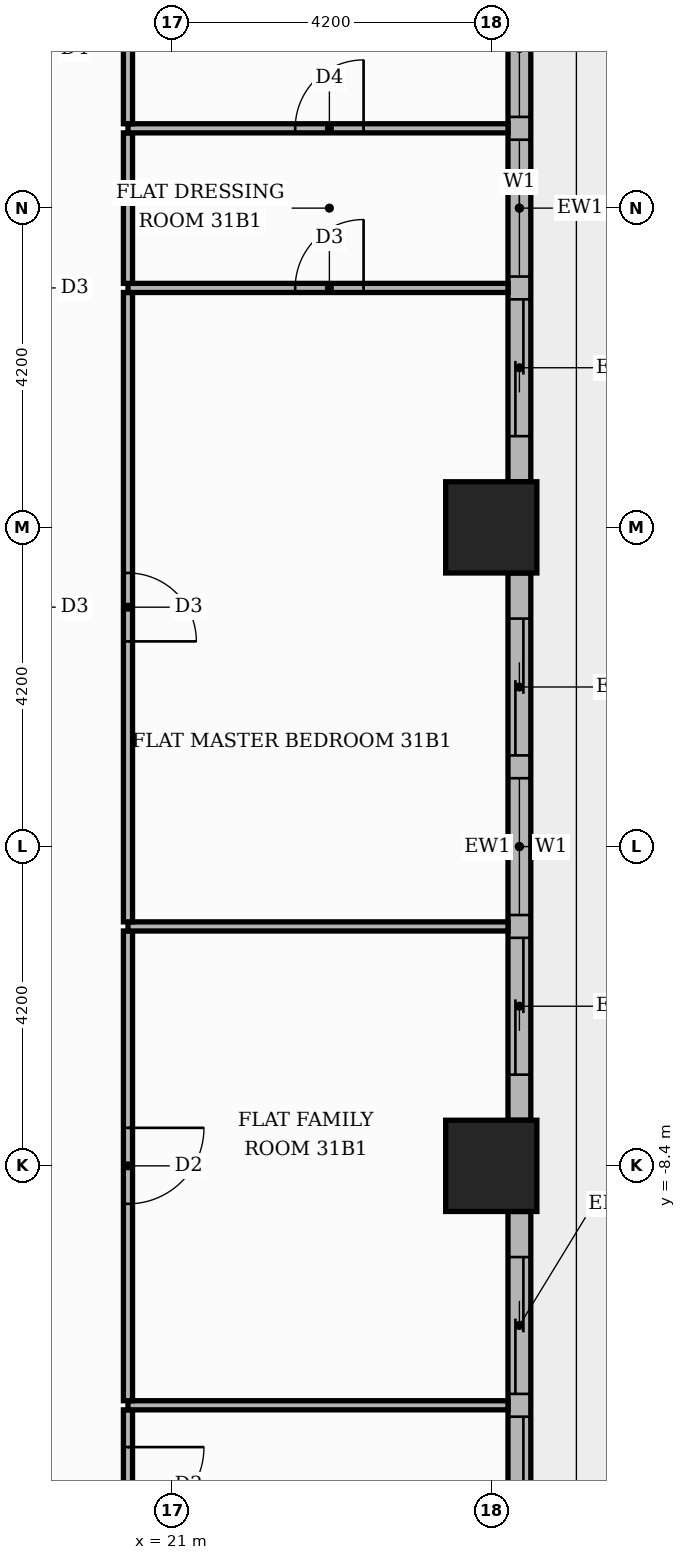
"""IFC4 building model, lengths in metres.
Left out: names, types, materials, properties, quantities, classifications, styles, units other than length and angle.
Written with IfcOpenShell. Run it as: python <this file> out.ifc"""

import sys

from ifc_helpers import new_model, si_unit, direction, frame, frame_2d, origin, origin_2d, place, context, subcontext, project, spatial, rectangle, extrude, element, fill, save


model = new_model("IFC4")
c1 = context("Model", 3, precision=1e-05, world=origin(), true_north=direction((0.0, 1.0)))
c2 = subcontext(c1, "Body", "Model", "MODEL_VIEW")
j1 = project(units=[si_unit("LENGTHUNIT", "METRE"), si_unit("PLANEANGLEUNIT", "RADIAN")], contexts=[c1])
p1 = place(None, origin())
s1 = spatial("IfcSite", under=j1, at=p1, CompositionType="ELEMENT")
p2 = place(p1, origin())
s2 = spatial("IfcBuilding", under=s1, at=p2, CompositionType="ELEMENT")
p3 = place(p2, frame((0.0, 0.0, 133.8)))
s3 = spatial("IfcBuildingStorey", under=s2, at=p3, CompositionType="ELEMENT", Elevation=133.8)
for number, where, z_axis, x_axis in (
    (1, (25.2, 0.0, 0.0), (0.0, 0.0, 1.0), (1.0, 0.0, 0.0)),
    (2, (25.2, -8.4, 0.0), (0.0, 0.0, 1.0), (1.0, 0.0, 0.0)),
):
    element("IfcColumn", number, at=place(p3, frame(where, z_axis=z_axis, x_axis=x_axis)), inside=s3, PredefinedType="COLUMN", context=c2, shape_type="SweptSolid", body=[
        extrude(rectangle(XDim=1.2, YDim=1.2, at=origin_2d()), origin(), (0.0, 0.0, 1.0), 3.9),
    ])
p4 = place(p3, frame((25.57, -16.2, 0.0), z_axis=(0.0, 0.0, 1.0), x_axis=(0.0, 1.0, 0.0)))
e3 = element("IfcWall", 3, at=p4, inside=s3, PredefinedType="STANDARD", context=c2, shape_type="SweptSolid", body=[
    extrude(rectangle(XDim=7.2, YDim=0.3, at=frame_2d((3.6, 0.0))), origin(), (0.0, 0.0, 1.0), 3.48),
])
p5 = place(p4, frame((0.6, 0.0, 0.0)))
e4 = element("IfcOpeningElement", 4, at=p5, cuts=e3, PredefinedType="OPENING", context=c2, shape_type="SweptSolid", body=[
    extrude(rectangle(XDim=3.9, YDim=2.4, at=frame_2d((1.95, 1.2))), frame((0.0, 0.16, 0.0), z_axis=(0.0, -1.0, 0.0), x_axis=(1.0, 0.0, 0.0)), (0.0, 0.0, 1.0), 0.32),
])
p6 = place(p4, frame((4.8, 0.0, 0.0)))
e5 = element("IfcOpeningElement", 5, at=p6, cuts=e3, PredefinedType="OPENING", context=c2, shape_type="SweptSolid", body=[
    extrude(rectangle(XDim=1.8, YDim=2.4, at=frame_2d((0.9, 1.2))), frame((0.0, 0.16, 0.0), z_axis=(0.0, -1.0, 0.0), x_axis=(1.0, 0.0, 0.0)), (0.0, 0.0, 1.0), 0.32),
])
p7 = place(p3, frame((25.57, -7.8, 0.0), z_axis=(0.0, 0.0, 1.0), x_axis=(0.0, 1.0, 0.0)))
e6 = element("IfcWall", 6, at=p7, inside=s3, PredefinedType="STANDARD", context=c2, shape_type="SweptSolid", body=[
    extrude(rectangle(XDim=7.2, YDim=0.3, at=frame_2d((3.6, 0.0))), origin(), (0.0, 0.0, 1.0), 3.48),
])
p8 = place(p7, frame((0.6, 0.0, 0.0)))
e7 = element("IfcOpeningElement", 7, at=p8, cuts=e6, PredefinedType="OPENING", context=c2, shape_type="SweptSolid", body=[
    extrude(rectangle(XDim=1.8, YDim=2.4, at=frame_2d((0.9, 1.2))), frame((0.0, 0.16, 0.0), z_axis=(0.0, -1.0, 0.0), x_axis=(1.0, 0.0, 0.0)), (0.0, 0.0, 1.0), 0.32),
])
p9 = place(p7, frame((2.7, 0.0, 0.9)))
e8 = element("IfcOpeningElement", 8, at=p9, cuts=e6, PredefinedType="OPENING", context=c2, shape_type="SweptSolid", body=[
    extrude(rectangle(XDim=1.8, YDim=2.1, at=frame_2d((0.9, 1.05))), frame((0.0, 0.16, 0.0), z_axis=(0.0, -1.0, 0.0), x_axis=(1.0, 0.0, 0.0)), (0.0, 0.0, 1.0), 0.32),
])
p10 = place(p7, frame((4.8, 0.0, 0.0)))
e9 = element("IfcOpeningElement", 9, at=p10, cuts=e6, PredefinedType="OPENING", context=c2, shape_type="SweptSolid", body=[
    extrude(rectangle(XDim=1.8, YDim=2.4, at=frame_2d((0.9, 1.2))), frame((0.0, 0.16, 0.0), z_axis=(0.0, -1.0, 0.0), x_axis=(1.0, 0.0, 0.0)), (0.0, 0.0, 1.0), 0.32),
])
p11 = place(p3, frame((25.57, 0.6, 0.0), z_axis=(0.0, 0.0, 1.0), x_axis=(0.0, 1.0, 0.0)))
e10 = element("IfcWall", 10, at=p11, inside=s3, PredefinedType="STANDARD", context=c2, shape_type="SweptSolid", body=[
    extrude(rectangle(XDim=7.2, YDim=0.3, at=frame_2d((3.6, 0.0))), origin(), (0.0, 0.0, 1.0), 3.48),
])
p12 = place(p11, frame((0.6, 0.0, 0.0)))
e11 = element("IfcOpeningElement", 11, at=p12, cuts=e10, PredefinedType="OPENING", context=c2, shape_type="SweptSolid", body=[
    extrude(rectangle(XDim=1.8, YDim=2.4, at=frame_2d((0.9, 1.2))), frame((0.0, 0.16, 0.0), z_axis=(0.0, -1.0, 0.0), x_axis=(1.0, 0.0, 0.0)), (0.0, 0.0, 1.0), 0.32),
])
p13 = place(p11, frame((2.7, 0.0, 0.9)))
e12 = element("IfcOpeningElement", 12, at=p13, cuts=e10, PredefinedType="OPENING", context=c2, shape_type="SweptSolid", body=[
    extrude(rectangle(XDim=1.8, YDim=2.1, at=frame_2d((0.9, 1.05))), frame((0.0, 0.16, 0.0), z_axis=(0.0, -1.0, 0.0), x_axis=(1.0, 0.0, 0.0)), (0.0, 0.0, 1.0), 0.32),
])
p14 = place(p11, frame((4.8, 0.0, 0.9)))
e13 = element("IfcOpeningElement", 13, at=p14, cuts=e10, PredefinedType="OPENING", context=c2, shape_type="SweptSolid", body=[
    extrude(rectangle(XDim=1.8, YDim=2.1, at=frame_2d((0.9, 1.05))), frame((0.0, 0.16, 0.0), z_axis=(0.0, -1.0, 0.0), x_axis=(1.0, 0.0, 0.0)), (0.0, 0.0, 1.0), 0.32),
])
p15 = place(p3, frame((20.42, -13.59, 0.0), z_axis=(0.0, 0.0, 1.0), x_axis=(0.0, 1.0, 0.0)))
e14 = element("IfcWall", 14, at=p15, inside=s3, PredefinedType="PARTITIONING", context=c2, shape_type="SweptSolid", body=[
    extrude(rectangle(XDim=1.98, YDim=0.12, at=frame_2d((0.99, 0.0))), origin(), (0.0, 0.0, 1.0), 3.48),
])
p16 = place(p15, frame((0.49, 0.0, 0.0)))
e15 = element("IfcOpeningElement", 15, at=p16, cuts=e14, PredefinedType="OPENING", context=c2, shape_type="SweptSolid", body=[
    extrude(rectangle(XDim=1.0, YDim=2.1, at=frame_2d((0.5, 1.05))), frame((0.0, 0.07, 0.0), z_axis=(0.0, -1.0, 0.0), x_axis=(1.0, 0.0, 0.0)), (0.0, 0.0, 1.0), 0.14),
])
p17 = place(p3, frame((20.42, -11.55, 0.0), z_axis=(0.0, 0.0, 1.0), x_axis=(1.0, 0.0, 0.0)))
e16 = element("IfcWall", 16, at=p17, inside=s3, PredefinedType="PARTITIONING", context=c2, shape_type="SweptSolid", body=[
    extrude(rectangle(XDim=5.0, YDim=0.12, at=frame_2d((2.5, 0.0))), origin(), (0.0, 0.0, 1.0), 3.48),
])
p18 = place(p3, frame((20.42, -11.49, 0.0), z_axis=(0.0, 0.0, 1.0), x_axis=(0.0, 1.0, 0.0)))
e17 = element("IfcWall", 17, at=p18, inside=s3, PredefinedType="PARTITIONING", context=c2, shape_type="SweptSolid", body=[
    extrude(rectangle(XDim=6.18, YDim=0.12, at=frame_2d((3.09, 0.0))), origin(), (0.0, 0.0, 1.0), 3.48),
])
p19 = place(p18, frame((2.59, 0.0, 0.0)))
e18 = element("IfcOpeningElement", 18, at=p19, cuts=e17, PredefinedType="OPENING", context=c2, shape_type="SweptSolid", body=[
    extrude(rectangle(XDim=1.0, YDim=2.1, at=frame_2d((0.5, 1.05))), frame((0.0, 0.07, 0.0), z_axis=(0.0, -1.0, 0.0), x_axis=(1.0, 0.0, 0.0)), (0.0, 0.0, 1.0), 0.14),
])
p20 = place(p3, frame((20.42, -5.25, 0.0), z_axis=(0.0, 0.0, 1.0), x_axis=(1.0, 0.0, 0.0)))
e19 = element("IfcWall", 19, at=p20, inside=s3, PredefinedType="PARTITIONING", context=c2, shape_type="SweptSolid", body=[
    extrude(rectangle(XDim=5.0, YDim=0.12, at=frame_2d((2.5, 0.0))), origin(), (0.0, 0.0, 1.0), 3.48),
])
p21 = place(p3, frame((20.42, -5.19, 0.0), z_axis=(0.0, 0.0, 1.0), x_axis=(0.0, 1.0, 0.0)))
e20 = element("IfcWall", 20, at=p21, inside=s3, PredefinedType="PARTITIONING", context=c2, shape_type="SweptSolid", body=[
    extrude(rectangle(XDim=8.28, YDim=0.12, at=frame_2d((4.14, 0.0))), origin(), (0.0, 0.0, 1.0), 3.48),
])
p22 = place(p21, frame((3.69, 0.0, 0.0)))
e21 = element("IfcOpeningElement", 21, at=p22, cuts=e20, PredefinedType="OPENING", context=c2, shape_type="SweptSolid", body=[
    extrude(rectangle(XDim=0.9, YDim=2.1, at=frame_2d((0.45, 1.05))), frame((0.0, 0.07, 0.0), z_axis=(0.0, -1.0, 0.0), x_axis=(1.0, 0.0, 0.0)), (0.0, 0.0, 1.0), 0.14),
])
p23 = place(p3, frame((20.42, 3.15, 0.0), z_axis=(0.0, 0.0, 1.0), x_axis=(1.0, 0.0, 0.0)))
e22 = element("IfcWall", 22, at=p23, inside=s3, PredefinedType="PARTITIONING", context=c2, shape_type="SweptSolid", body=[
    extrude(rectangle(XDim=5.0, YDim=0.12, at=frame_2d((2.5, 0.0))), origin(), (0.0, 0.0, 1.0), 3.48),
])
p24 = place(p23, frame((2.2, 0.0, 0.0)))
e23 = element("IfcOpeningElement", 23, at=p24, cuts=e22, PredefinedType="OPENING", context=c2, shape_type="SweptSolid", body=[
    extrude(rectangle(XDim=0.9, YDim=2.1, at=frame_2d((0.45, 1.05))), frame((0.0, 0.07, 0.0), z_axis=(0.0, -1.0, 0.0), x_axis=(1.0, 0.0, 0.0)), (0.0, 0.0, 1.0), 0.14),
])
p25 = place(p3, frame((20.42, 3.21, 0.0), z_axis=(0.0, 0.0, 1.0), x_axis=(0.0, 1.0, 0.0)))
e24 = element("IfcWall", 24, at=p25, inside=s3, PredefinedType="PARTITIONING", context=c2, shape_type="SweptSolid", body=[
    extrude(rectangle(XDim=1.98, YDim=0.12, at=frame_2d((0.99, 0.0))), origin(), (0.0, 0.0, 1.0), 3.48),
])
p26 = place(p3, frame((20.42, 5.25, 0.0), z_axis=(0.0, 0.0, 1.0), x_axis=(1.0, 0.0, 0.0)))
e25 = element("IfcWall", 25, at=p26, inside=s3, PredefinedType="PARTITIONING", context=c2, shape_type="SweptSolid", body=[
    extrude(rectangle(XDim=5.0, YDim=0.12, at=frame_2d((2.5, 0.0))), origin(), (0.0, 0.0, 1.0), 3.48),
])
p27 = place(p26, frame((2.2, 0.0, 0.0)))
e26 = element("IfcOpeningElement", 26, at=p27, cuts=e25, PredefinedType="OPENING", context=c2, shape_type="SweptSolid", body=[
    extrude(rectangle(XDim=0.9, YDim=2.1, at=frame_2d((0.45, 1.05))), frame((0.0, 0.07, 0.0), z_axis=(0.0, -1.0, 0.0), x_axis=(1.0, 0.0, 0.0)), (0.0, 0.0, 1.0), 0.14),
])
p28 = place(p3, frame((20.42, 5.31, 0.0), z_axis=(0.0, 0.0, 1.0), x_axis=(0.0, 1.0, 0.0)))
e27 = element("IfcWall", 27, at=p28, inside=s3, PredefinedType="PARTITIONING", context=c2, shape_type="SweptSolid", body=[
    extrude(rectangle(XDim=1.98, YDim=0.12, at=frame_2d((0.99, 0.0))), origin(), (0.0, 0.0, 1.0), 3.48),
])
p29 = place(p5, origin())
e28 = element("IfcDoor", 28, at=p29, inside=s3, OperationType="SLIDING_TO_LEFT", PredefinedType="DOOR", context=c2, shape_type="SweptSolid", body=[
    extrude(rectangle(XDim=3.9, YDim=2.4, at=frame_2d((1.95, 1.2))), frame((0.0, 0.025, 0.0), z_axis=(0.0, -1.0, 0.0), x_axis=(1.0, 0.0, 0.0)), (0.0, 0.0, 1.0), 0.05),
])
fill(e4, e28)
p30 = place(p6, origin())
e29 = element("IfcDoor", 29, at=p30, inside=s3, OperationType="SLIDING_TO_RIGHT", PredefinedType="DOOR", context=c2, shape_type="SweptSolid", body=[
    extrude(rectangle(XDim=1.8, YDim=2.4, at=frame_2d((0.9, 1.2))), frame((0.0, 0.025, 0.0), z_axis=(0.0, -1.0, 0.0), x_axis=(1.0, 0.0, 0.0)), (0.0, 0.0, 1.0), 0.05),
])
fill(e5, e29)
p31 = place(p8, origin())
e30 = element("IfcDoor", 30, at=p31, inside=s3, OperationType="SLIDING_TO_LEFT", PredefinedType="DOOR", context=c2, shape_type="SweptSolid", body=[
    extrude(rectangle(XDim=1.8, YDim=2.4, at=frame_2d((0.9, 1.2))), frame((0.0, 0.025, 0.0), z_axis=(0.0, -1.0, 0.0), x_axis=(1.0, 0.0, 0.0)), (0.0, 0.0, 1.0), 0.05),
])
fill(e7, e30)
p32 = place(p9, origin())
e31 = element("IfcWindow", 31, at=p32, inside=s3, PartitioningType="SINGLE_PANEL", PredefinedType="WINDOW", context=c2, shape_type="SweptSolid", body=[
    extrude(rectangle(XDim=1.8, YDim=2.1, at=frame_2d((0.9, 1.05))), frame((0.0, 0.03, 0.0), z_axis=(0.0, -1.0, 0.0), x_axis=(1.0, 0.0, 0.0)), (0.0, 0.0, 1.0), 0.06),
])
fill(e8, e31)
p33 = place(p10, origin())
e32 = element("IfcDoor", 32, at=p33, inside=s3, OperationType="SLIDING_TO_RIGHT", PredefinedType="DOOR", context=c2, shape_type="SweptSolid", body=[
    extrude(rectangle(XDim=1.8, YDim=2.4, at=frame_2d((0.9, 1.2))), frame((0.0, 0.025, 0.0), z_axis=(0.0, -1.0, 0.0), x_axis=(1.0, 0.0, 0.0)), (0.0, 0.0, 1.0), 0.05),
])
fill(e9, e32)
p34 = place(p12, origin())
e33 = element("IfcDoor", 33, at=p34, inside=s3, OperationType="SLIDING_TO_LEFT", PredefinedType="DOOR", context=c2, shape_type="SweptSolid", body=[
    extrude(rectangle(XDim=1.8, YDim=2.4, at=frame_2d((0.9, 1.2))), frame((0.0, 0.025, 0.0), z_axis=(0.0, -1.0, 0.0), x_axis=(1.0, 0.0, 0.0)), (0.0, 0.0, 1.0), 0.05),
])
fill(e11, e33)
p35 = place(p13, origin())
e34 = element("IfcWindow", 34, at=p35, inside=s3, PartitioningType="SINGLE_PANEL", PredefinedType="WINDOW", context=c2, shape_type="SweptSolid", body=[
    extrude(rectangle(XDim=1.8, YDim=2.1, at=frame_2d((0.9, 1.05))), frame((0.0, 0.03, 0.0), z_axis=(0.0, -1.0, 0.0), x_axis=(1.0, 0.0, 0.0)), (0.0, 0.0, 1.0), 0.06),
])
fill(e12, e34)
p36 = place(p14, origin())
e35 = element("IfcWindow", 35, at=p36, inside=s3, PartitioningType="SINGLE_PANEL", PredefinedType="WINDOW", context=c2, shape_type="SweptSolid", body=[
    extrude(rectangle(XDim=1.8, YDim=2.1, at=frame_2d((0.9, 1.05))), frame((0.0, 0.03, 0.0), z_axis=(0.0, -1.0, 0.0), x_axis=(1.0, 0.0, 0.0)), (0.0, 0.0, 1.0), 0.06),
])
fill(e13, e35)
p37 = place(p16, frame((1.0, 0.0, 0.0), z_axis=(0.0, 0.0, 1.0), x_axis=(-1.0, 0.0, 0.0)))
e36 = element("IfcDoor", 36, at=p37, inside=s3, OperationType="SINGLE_SWING_RIGHT", PredefinedType="DOOR", context=c2, shape_type="SweptSolid", body=[
    extrude(rectangle(XDim=1.0, YDim=2.1, at=frame_2d((0.5, 1.05))), frame((0.0, 0.025, 0.0), z_axis=(0.0, -1.0, 0.0), x_axis=(1.0, 0.0, 0.0)), (0.0, 0.0, 1.0), 0.05),
])
fill(e15, e36)
p38 = place(p19, frame((1.0, 0.0, 0.0), z_axis=(0.0, 0.0, 1.0), x_axis=(-1.0, 0.0, 0.0)))
e37 = element("IfcDoor", 37, at=p38, inside=s3, OperationType="SINGLE_SWING_RIGHT", PredefinedType="DOOR", context=c2, shape_type="SweptSolid", body=[
    extrude(rectangle(XDim=1.0, YDim=2.1, at=frame_2d((0.5, 1.05))), frame((0.0, 0.025, 0.0), z_axis=(0.0, -1.0, 0.0), x_axis=(1.0, 0.0, 0.0)), (0.0, 0.0, 1.0), 0.05),
])
fill(e18, e37)
p39 = place(p22, frame((0.9, 0.0, 0.0), z_axis=(0.0, 0.0, 1.0), x_axis=(-1.0, 0.0, 0.0)))
e38 = element("IfcDoor", 38, at=p39, inside=s3, OperationType="SINGLE_SWING_LEFT", PredefinedType="DOOR", context=c2, shape_type="SweptSolid", body=[
    extrude(rectangle(XDim=0.9, YDim=2.1, at=frame_2d((0.45, 1.05))), frame((0.0, 0.025, 0.0), z_axis=(0.0, -1.0, 0.0), x_axis=(1.0, 0.0, 0.0)), (0.0, 0.0, 1.0), 0.05),
])
fill(e21, e38)
p40 = place(p24, origin())
e39 = element("IfcDoor", 39, at=p40, inside=s3, OperationType="SINGLE_SWING_RIGHT", PredefinedType="DOOR", context=c2, shape_type="SweptSolid", body=[
    extrude(rectangle(XDim=0.9, YDim=2.1, at=frame_2d((0.45, 1.05))), frame((0.0, 0.025, 0.0), z_axis=(0.0, -1.0, 0.0), x_axis=(1.0, 0.0, 0.0)), (0.0, 0.0, 1.0), 0.05),
])
fill(e23, e39)
p41 = place(p27, origin())
e40 = element("IfcDoor", 40, at=p41, inside=s3, OperationType="SINGLE_SWING_RIGHT", PredefinedType="DOOR", context=c2, shape_type="SweptSolid", body=[
    extrude(rectangle(XDim=0.9, YDim=2.1, at=frame_2d((0.45, 1.05))), frame((0.0, 0.025, 0.0), z_axis=(0.0, -1.0, 0.0), x_axis=(1.0, 0.0, 0.0)), (0.0, 0.0, 1.0), 0.05),
])
fill(e26, e40)
save(model, sys.argv[1])
